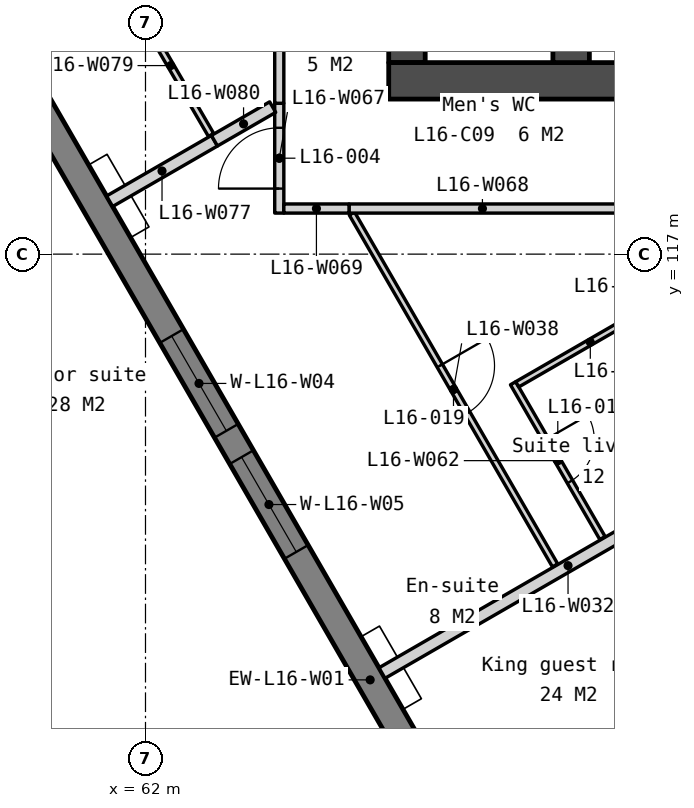
"""IFC4 building model, lengths in metres.
Left out: names, types, materials, properties, quantities, classifications, styles, units other than length and angle.
Written with IfcOpenShell. Run it as: python <this file> out.ifc"""

import sys

from ifc_helpers import new_model, si_unit, direction, frame, frame_2d, origin, place, context, subcontext, project, spatial, polyline, rectangle, outline, extrude, element, fill, save


model = new_model("IFC4")
c1 = context("Model", 3, precision=1e-05, world=origin(), true_north=direction((0.0, 1.0)))
c2 = subcontext(c1, "Body", "Model", "MODEL_VIEW")
j1 = project(units=[si_unit("LENGTHUNIT", "METRE"), si_unit("PLANEANGLEUNIT", "RADIAN")], contexts=[c1])
p1 = place(None, origin())
s1 = spatial("IfcSite", under=j1, at=p1, CompositionType="ELEMENT")
p2 = place(p1, origin())
s2 = spatial("IfcBuilding", under=s1, at=p2, CompositionType="ELEMENT")
p3 = place(p2, frame((0.0, 0.0, 70.0)))
s3 = spatial("IfcBuildingStorey", under=s2, at=p3, CompositionType="ELEMENT", Elevation=70.0)
p4 = place(p3, frame((66.3, 133.95, 0.0), z_axis=(0.0, 0.0, 1.0), x_axis=(0.0, -1.0, 0.0)))
e1 = element("IfcWall", 1, at=p4, inside=s3, PredefinedType="SOLIDWALL", context=c2, shape_type="SweptSolid", body=[
    extrude(rectangle(XDim=13.8, YDim=0.6, at=frame_2d((6.9, 0.0))), origin(), (0.0, 0.0, 1.0), 3.35),
])
p5 = place(p4, frame((0.6, 0.0, 0.0)))
e2 = element("IfcOpeningElement", 2, at=p5, cuts=e1, PredefinedType="OPENING", context=c2, shape_type="SweptSolid", body=[
    extrude(rectangle(XDim=1.1, YDim=2.1, at=frame_2d((0.55, 1.05))), frame((0.0, 0.31, 0.0), z_axis=(0.0, -1.0, 0.0), x_axis=(1.0, 0.0, 0.0)), (0.0, 0.0, 1.0), 0.62),
])
p6 = place(p4, frame((8.963, 0.0, 0.0)))
e3 = element("IfcOpeningElement", 3, at=p6, cuts=e1, PredefinedType="OPENING", context=c2, shape_type="SweptSolid", body=[
    extrude(rectangle(XDim=1.0, YDim=2.1, at=frame_2d((0.5, 1.05))), frame((0.0, 0.31, 0.0), z_axis=(0.0, -1.0, 0.0), x_axis=(1.0, 0.0, 0.0)), (0.0, 0.0, 1.0), 0.62),
])
p7 = place(p4, frame((11.888, 0.0, 0.0)))
e4 = element("IfcOpeningElement", 4, at=p7, cuts=e1, PredefinedType="OPENING", context=c2, shape_type="SweptSolid", body=[
    extrude(rectangle(XDim=1.0, YDim=2.1, at=frame_2d((0.5, 1.05))), frame((0.0, 0.31, 0.0), z_axis=(0.0, -1.0, 0.0), x_axis=(1.0, 0.0, 0.0)), (0.0, 0.0, 1.0), 0.62),
])
p8 = place(p3, frame((66.0, 119.85, 0.0), z_axis=(0.0, 0.0, 1.0), x_axis=(1.0, 0.0, 0.0)))
e5 = element("IfcWall", 5, at=p8, inside=s3, PredefinedType="SOLIDWALL", context=c2, shape_type="SweptSolid", body=[
    extrude(rectangle(XDim=28.0, YDim=0.6, at=frame_2d((14.0, 0.0))), origin(), (0.0, 0.0, 1.0), 3.35),
])
p9 = place(p8, frame((6.825, 0.0, 0.0)))
e6 = element("IfcOpeningElement", 6, at=p9, cuts=e5, PredefinedType="OPENING", context=c2, shape_type="SweptSolid", body=[
    extrude(rectangle(XDim=1.8, YDim=2.1, at=frame_2d((0.9, 1.05))), frame((0.0, 0.31, 0.0), z_axis=(0.0, -1.0, 0.0), x_axis=(1.0, 0.0, 0.0)), (0.0, 0.0, 1.0), 0.62),
])
p10 = place(p8, frame((15.85, 0.0, 0.0)))
e7 = element("IfcOpeningElement", 7, at=p10, cuts=e5, PredefinedType="OPENING", context=c2, shape_type="SweptSolid", body=[
    extrude(rectangle(XDim=1.5, YDim=2.1, at=frame_2d((0.75, 1.05))), frame((0.0, 0.31, 0.0), z_axis=(0.0, -1.0, 0.0), x_axis=(1.0, 0.0, 0.0)), (0.0, 0.0, 1.0), 0.62),
])
p11 = place(p8, frame((19.375, 0.0, 0.0)))
e8 = element("IfcOpeningElement", 8, at=p11, cuts=e5, PredefinedType="OPENING", context=c2, shape_type="SweptSolid", body=[
    extrude(rectangle(XDim=1.8, YDim=2.1, at=frame_2d((0.9, 1.05))), frame((0.0, 0.31, 0.0), z_axis=(0.0, -1.0, 0.0), x_axis=(1.0, 0.0, 0.0)), (0.0, 0.0, 1.0), 0.62),
])
p12 = place(p8, frame((4.425, 0.0, 0.0)))
e9 = element("IfcOpeningElement", 9, at=p12, cuts=e5, PredefinedType="OPENING", context=c2, shape_type="SweptSolid", body=[
    extrude(rectangle(XDim=1.0, YDim=2.1, at=frame_2d((0.5, 1.05))), frame((0.0, 0.31, 0.0), z_axis=(0.0, -1.0, 0.0), x_axis=(1.0, 0.0, 0.0)), (0.0, 0.0, 1.0), 0.62),
])
p13 = place(p8, frame((9.783, 0.0, 0.0)))
e10 = element("IfcOpeningElement", 10, at=p13, cuts=e5, PredefinedType="OPENING", context=c2, shape_type="SweptSolid", body=[
    extrude(rectangle(XDim=1.0, YDim=2.1, at=frame_2d((0.5, 1.05))), frame((0.0, 0.31, 0.0), z_axis=(0.0, -1.0, 0.0), x_axis=(1.0, 0.0, 0.0)), (0.0, 0.0, 1.0), 0.62),
])
p14 = place(p8, frame((11.525, 0.0, 0.0)))
e11 = element("IfcOpeningElement", 11, at=p14, cuts=e5, PredefinedType="OPENING", context=c2, shape_type="SweptSolid", body=[
    extrude(rectangle(XDim=1.0, YDim=2.1, at=frame_2d((0.5, 1.05))), frame((0.0, 0.31, 0.0), z_axis=(0.0, -1.0, 0.0), x_axis=(1.0, 0.0, 0.0)), (0.0, 0.0, 1.0), 0.62),
])
p15 = place(p8, frame((13.658, 0.0, 0.0)))
e12 = element("IfcOpeningElement", 12, at=p15, cuts=e5, PredefinedType="OPENING", context=c2, shape_type="SweptSolid", body=[
    extrude(rectangle(XDim=1.0, YDim=2.1, at=frame_2d((0.5, 1.05))), frame((0.0, 0.31, 0.0), z_axis=(0.0, -1.0, 0.0), x_axis=(1.0, 0.0, 0.0)), (0.0, 0.0, 1.0), 0.62),
])
p16 = place(p8, frame((22.575, 0.0, 0.0)))
e13 = element("IfcOpeningElement", 13, at=p16, cuts=e5, PredefinedType="OPENING", context=c2, shape_type="SweptSolid", body=[
    extrude(rectangle(XDim=1.0, YDim=2.1, at=frame_2d((0.5, 1.05))), frame((0.0, 0.31, 0.0), z_axis=(0.0, -1.0, 0.0), x_axis=(1.0, 0.0, 0.0)), (0.0, 0.0, 1.0), 0.62),
])
p17 = place(p3, frame((69.0, 122.25, 0.0), z_axis=(0.0, 0.0, 1.0), x_axis=(0.0, -1.0, 0.0)))
e14 = element("IfcWall", 14, at=p17, inside=s3, PredefinedType="SOLIDWALL", context=c2, shape_type="SweptSolid", body=[
    extrude(rectangle(XDim=2.1, YDim=0.6, at=frame_2d((1.05, 0.0))), origin(), (0.0, 0.0, 1.0), 3.35),
])
p18 = place(p3, frame((54.495, 129.397, -0.15), z_axis=(0.0, 0.0, 1.0), x_axis=(0.499999201451, -0.866025864826, 0.0)))
e15 = element("IfcWall", 15, at=p18, inside=s3, PredefinedType="SOLIDWALL", context=c2, shape_type="SweptSolid", body=[
    extrude(outline(polyline([(44.8, 0.0), (44.8, 3.5), (0.0, 3.5), (0.0, 0.0), (44.8, 0.0)])), frame((0.0, 0.225, 0.0), z_axis=(0.0, -1.0, 0.0), x_axis=(1.0, 0.0, 0.0)), (0.0, 0.0, 1.0), 0.45),
])
p19 = place(p18, frame((0.786, 0.0, 1.05)))
e16 = element("IfcOpeningElement", 16, at=p19, cuts=e15, PredefinedType="OPENING", context=c2, shape_type="SweptSolid", body=[
    extrude(rectangle(XDim=1.2, YDim=1.5, at=frame_2d((0.6, 0.75))), frame((0.0, 0.235, 0.0), z_axis=(0.0, -1.0, 0.0), x_axis=(1.0, 0.0, 0.0)), (0.0, 0.0, 1.0), 0.47),
])
p20 = place(p18, frame((6.91, 0.0, 1.05)))
e17 = element("IfcOpeningElement", 17, at=p20, cuts=e15, PredefinedType="OPENING", context=c2, shape_type="SweptSolid", body=[
    extrude(rectangle(XDim=1.8, YDim=1.5, at=frame_2d((0.9, 0.75))), frame((0.0, 0.235, 0.0), z_axis=(0.0, -1.0, 0.0), x_axis=(1.0, 0.0, 0.0)), (0.0, 0.0, 1.0), 0.47),
])
p21 = place(p18, frame((9.21, 0.0, 1.05)))
e18 = element("IfcOpeningElement", 18, at=p21, cuts=e15, PredefinedType="OPENING", context=c2, shape_type="SweptSolid", body=[
    extrude(rectangle(XDim=1.8, YDim=1.5, at=frame_2d((0.9, 0.75))), frame((0.0, 0.235, 0.0), z_axis=(0.0, -1.0, 0.0), x_axis=(1.0, 0.0, 0.0)), (0.0, 0.0, 1.0), 0.47),
])
p22 = place(p18, frame((15.87, 0.0, 1.05)))
e19 = element("IfcOpeningElement", 19, at=p22, cuts=e15, PredefinedType="OPENING", context=c2, shape_type="SweptSolid", body=[
    extrude(rectangle(XDim=1.8, YDim=1.5, at=frame_2d((0.9, 0.75))), frame((0.0, 0.235, 0.0), z_axis=(0.0, -1.0, 0.0), x_axis=(1.0, 0.0, 0.0)), (0.0, 0.0, 1.0), 0.47),
])
p23 = place(p18, frame((18.17, 0.0, 1.05)))
e20 = element("IfcOpeningElement", 20, at=p23, cuts=e15, PredefinedType="OPENING", context=c2, shape_type="SweptSolid", body=[
    extrude(rectangle(XDim=1.8, YDim=1.5, at=frame_2d((0.9, 0.75))), frame((0.0, 0.235, 0.0), z_axis=(0.0, -1.0, 0.0), x_axis=(1.0, 0.0, 0.0)), (0.0, 0.0, 1.0), 0.47),
])
p24 = place(p18, frame((24.83, 0.0, 1.05)))
e21 = element("IfcOpeningElement", 21, at=p24, cuts=e15, PredefinedType="OPENING", context=c2, shape_type="SweptSolid", body=[
    extrude(rectangle(XDim=1.8, YDim=1.5, at=frame_2d((0.9, 0.75))), frame((0.0, 0.235, 0.0), z_axis=(0.0, -1.0, 0.0), x_axis=(1.0, 0.0, 0.0)), (0.0, 0.0, 1.0), 0.47),
])
p25 = place(p18, frame((27.13, 0.0, 1.05)))
e22 = element("IfcOpeningElement", 22, at=p25, cuts=e15, PredefinedType="OPENING", context=c2, shape_type="SweptSolid", body=[
    extrude(rectangle(XDim=1.8, YDim=1.5, at=frame_2d((0.9, 0.75))), frame((0.0, 0.235, 0.0), z_axis=(0.0, -1.0, 0.0), x_axis=(1.0, 0.0, 0.0)), (0.0, 0.0, 1.0), 0.47),
])
p26 = place(p18, frame((33.79, 0.0, 1.05)))
e23 = element("IfcOpeningElement", 23, at=p26, cuts=e15, PredefinedType="OPENING", context=c2, shape_type="SweptSolid", body=[
    extrude(rectangle(XDim=1.8, YDim=1.5, at=frame_2d((0.9, 0.75))), frame((0.0, 0.235, 0.0), z_axis=(0.0, -1.0, 0.0), x_axis=(1.0, 0.0, 0.0)), (0.0, 0.0, 1.0), 0.47),
])
p27 = place(p18, frame((36.09, 0.0, 1.05)))
e24 = element("IfcOpeningElement", 24, at=p27, cuts=e15, PredefinedType="OPENING", context=c2, shape_type="SweptSolid", body=[
    extrude(rectangle(XDim=1.8, YDim=1.5, at=frame_2d((0.9, 0.75))), frame((0.0, 0.235, 0.0), z_axis=(0.0, -1.0, 0.0), x_axis=(1.0, 0.0, 0.0)), (0.0, 0.0, 1.0), 0.47),
])
p28 = place(p18, frame((42.814, 0.0, 1.05)))
e25 = element("IfcOpeningElement", 25, at=p28, cuts=e15, PredefinedType="OPENING", context=c2, shape_type="SweptSolid", body=[
    extrude(rectangle(XDim=1.2, YDim=1.5, at=frame_2d((0.6, 0.75))), frame((0.0, 0.235, 0.0), z_axis=(0.0, -1.0, 0.0), x_axis=(1.0, 0.0, 0.0)), (0.0, 0.0, 1.0), 0.47),
])
p29 = place(p3, frame((65.89, 110.11, 0.0), z_axis=(0.0, 0.0, 1.0), x_axis=(0.866033669941, 0.499985682323, 0.0)))
e26 = element("IfcWall", 26, at=p29, inside=s3, PredefinedType="PARTITIONING", context=c2, shape_type="SweptSolid", body=[
    extrude(rectangle(XDim=7.065, YDim=0.2, at=frame_2d((3.533, 0.0))), origin(), (0.0, 0.0, 1.0), 3.35),
])
p30 = place(p3, frame((65.395, 117.668, 0.0), z_axis=(0.0, 0.0, 1.0), x_axis=(0.499986003774, -0.866033484359, 0.0)))
e27 = element("IfcWall", 27, at=p30, inside=s3, PredefinedType="PARTITIONING", context=c2, shape_type="SweptSolid", body=[
    extrude(rectangle(XDim=6.682, YDim=0.1, at=frame_2d((3.341, 0.0))), origin(), (0.0, 0.0, 1.0), 3.35),
])
p31 = place(p30, frame((2.891, 0.0, 0.0)))
e28 = element("IfcOpeningElement", 28, at=p31, cuts=e27, PredefinedType="OPENING", context=c2, shape_type="SweptSolid", body=[
    extrude(rectangle(XDim=0.9, YDim=2.1, at=frame_2d((0.45, 1.05))), frame((0.0, 0.06, 0.0), z_axis=(0.0, -1.0, 0.0), x_axis=(1.0, 0.0, 0.0)), (0.0, 0.0, 1.0), 0.12),
])
p32 = place(p3, frame((68.045, 114.877, 0.0), z_axis=(0.0, 0.0, 1.0), x_axis=(0.499988418424, -0.866032090307, 0.0)))
e29 = element("IfcWall", 29, at=p32, inside=s3, PredefinedType="PARTITIONING", context=c2, shape_type="SweptSolid", body=[
    extrude(rectangle(XDim=2.94, YDim=0.1, at=frame_2d((1.47, 0.0))), origin(), (0.0, 0.0, 1.0), 3.35),
])
p33 = place(p32, frame((1.07, 0.0, 0.0)))
e30 = element("IfcOpeningElement", 30, at=p33, cuts=e29, PredefinedType="OPENING", context=c2, shape_type="SweptSolid", body=[
    extrude(rectangle(XDim=0.8, YDim=2.1, at=frame_2d((0.4, 1.05))), frame((0.0, 0.06, 0.0), z_axis=(0.0, -1.0, 0.0), x_axis=(1.0, 0.0, 0.0)), (0.0, 0.0, 1.0), 0.12),
])
p34 = place(p3, frame((68.114, 114.858, 0.0), z_axis=(0.0, 0.0, 1.0), x_axis=(0.866042014628, 0.499971228071, 0.0)))
e31 = element("IfcWall", 31, at=p34, inside=s3, PredefinedType="PARTITIONING", context=c2, shape_type="SweptSolid", body=[
    extrude(rectangle(XDim=2.775, YDim=0.1, at=frame_2d((1.388, 0.0))), origin(), (0.0, 0.0, 1.0), 3.35),
])
p35 = place(p3, frame((64.2, 117.675, 0.0), z_axis=(0.0, 0.0, 1.0), x_axis=(0.0, 1.0, 0.0)))
e32 = element("IfcWall", 32, at=p35, inside=s3, PredefinedType="PARTITIONING", context=c2, shape_type="SweptSolid", body=[
    extrude(rectangle(XDim=1.806, YDim=0.15, at=frame_2d((0.903, 0.0))), origin(), (0.0, 0.0, 1.0), 3.35),
])
p36 = place(p35, frame((0.403, 0.0, 0.0)))
e33 = element("IfcOpeningElement", 33, at=p36, cuts=e32, PredefinedType="OPENING", context=c2, shape_type="SweptSolid", body=[
    extrude(rectangle(XDim=1.0, YDim=2.1, at=frame_2d((0.5, 1.05))), frame((0.0, 0.085, 0.0), z_axis=(0.0, -1.0, 0.0), x_axis=(1.0, 0.0, 0.0)), (0.0, 0.0, 1.0), 0.17),
])
p37 = place(p3, frame((65.347, 117.75, 0.0), z_axis=(0.0, 0.0, 1.0), x_axis=(1.0, 0.0, 0.0)))
e34 = element("IfcWall", 34, at=p37, inside=s3, PredefinedType="PARTITIONING", context=c2, shape_type="SweptSolid", body=[
    extrude(rectangle(XDim=4.388, YDim=0.15, at=frame_2d((2.194, 0.0))), origin(), (0.0, 0.0, 1.0), 3.35),
])
p38 = place(p3, frame((64.275, 117.75, 0.0), z_axis=(0.0, 0.0, 1.0), x_axis=(1.0, 0.0, 0.0)))
e35 = element("IfcWall", 35, at=p38, inside=s3, PredefinedType="PARTITIONING", context=c2, shape_type="SweptSolid", body=[
    extrude(rectangle(XDim=1.072, YDim=0.15, at=frame_2d((0.536, 0.0))), origin(), (0.0, 0.0, 1.0), 3.35),
])
p39 = place(p3, frame((61.41, 117.87, 0.0), z_axis=(0.0, 0.0, 1.0), x_axis=(0.866038551572, 0.499977226672, 0.0)))
e36 = element("IfcWall", 36, at=p39, inside=s3, PredefinedType="PARTITIONING", context=c2, shape_type="SweptSolid", body=[
    extrude(rectangle(XDim=1.991, YDim=0.2, at=frame_2d((0.995, 0.0))), origin(), (0.0, 0.0, 1.0), 3.35),
])
p40 = place(p3, frame((61.75, 121.242, 0.0), z_axis=(0.0, 0.0, 1.0), x_axis=(0.503163628445, -0.86419116115, 0.0)))
e37 = element("IfcWall", 37, at=p40, inside=s3, PredefinedType="PARTITIONING", context=c2, shape_type="SweptSolid", body=[
    extrude(rectangle(XDim=2.64, YDim=0.1, at=frame_2d((1.32, 0.0))), origin(), (0.0, 0.0, 1.0), 3.35),
])
p41 = place(p3, frame((63.134, 118.865, 0.0), z_axis=(0.0, 0.0, 1.0), x_axis=(0.866075331272, 0.499913513082, 0.0)))
e38 = element("IfcWall", 38, at=p41, inside=s3, PredefinedType="PARTITIONING", context=c2, shape_type="SweptSolid", body=[
    extrude(rectangle(XDim=1.106, YDim=0.2, at=frame_2d((0.553, 0.0))), origin(), (0.0, 0.0, 1.0), 3.35),
])
p42 = place(p3, frame((64.2, 119.481, 0.0), z_axis=(0.0, 0.0, 1.0), x_axis=(0.0, 1.0, 0.0)))
e39 = element("IfcWall", 39, at=p42, inside=s3, PredefinedType="PARTITIONING", context=c2, shape_type="SweptSolid", body=[
    extrude(rectangle(XDim=3.118, YDim=0.15, at=frame_2d((1.559, 0.0))), origin(), (0.0, 0.0, 1.0), 3.35),
])
p43 = place(p22, origin())
e40 = element("IfcWindow", 40, at=p43, inside=s3, PartitioningType="SINGLE_PANEL", PredefinedType="WINDOW", context=c2, shape_type="SweptSolid", body=[
    extrude(rectangle(XDim=1.8, YDim=1.5, at=frame_2d((0.9, 0.75))), frame((0.0, 0.03, 0.0), z_axis=(0.0, -1.0, 0.0), x_axis=(1.0, 0.0, 0.0)), (0.0, 0.0, 1.0), 0.06),
])
fill(e19, e40)
p44 = place(p23, origin())
e41 = element("IfcWindow", 41, at=p44, inside=s3, PartitioningType="SINGLE_PANEL", PredefinedType="WINDOW", context=c2, shape_type="SweptSolid", body=[
    extrude(rectangle(XDim=1.8, YDim=1.5, at=frame_2d((0.9, 0.75))), frame((0.0, 0.03, 0.0), z_axis=(0.0, -1.0, 0.0), x_axis=(1.0, 0.0, 0.0)), (0.0, 0.0, 1.0), 0.06),
])
fill(e20, e41)
p45 = place(p36, origin())
e42 = element("IfcDoor", 42, at=p45, inside=s3, OperationType="SINGLE_SWING_LEFT", PredefinedType="DOOR", context=c2, shape_type="SweptSolid", body=[
    extrude(rectangle(XDim=1.0, YDim=2.1, at=frame_2d((0.5, 1.05))), frame((0.0, 0.025, 0.0), z_axis=(0.0, -1.0, 0.0), x_axis=(1.0, 0.0, 0.0)), (0.0, 0.0, 1.0), 0.05),
])
fill(e33, e42)
p46 = place(p33, origin())
e43 = element("IfcDoor", 43, at=p46, inside=s3, OperationType="SINGLE_SWING_LEFT", PredefinedType="DOOR", context=c2, shape_type="SweptSolid", body=[
    extrude(rectangle(XDim=0.8, YDim=2.1, at=frame_2d((0.4, 1.05))), frame((0.0, 0.025, 0.0), z_axis=(0.0, -1.0, 0.0), x_axis=(1.0, 0.0, 0.0)), (0.0, 0.0, 1.0), 0.05),
])
fill(e30, e43)
p47 = place(p31, origin())
e44 = element("IfcDoor", 44, at=p47, inside=s3, OperationType="SINGLE_SWING_LEFT", PredefinedType="DOOR", context=c2, shape_type="SweptSolid", body=[
    extrude(rectangle(XDim=0.9, YDim=2.1, at=frame_2d((0.45, 1.05))), frame((0.0, 0.025, 0.0), z_axis=(0.0, -1.0, 0.0), x_axis=(1.0, 0.0, 0.0)), (0.0, 0.0, 1.0), 0.05),
])
fill(e28, e44)
save(model, sys.argv[1])
